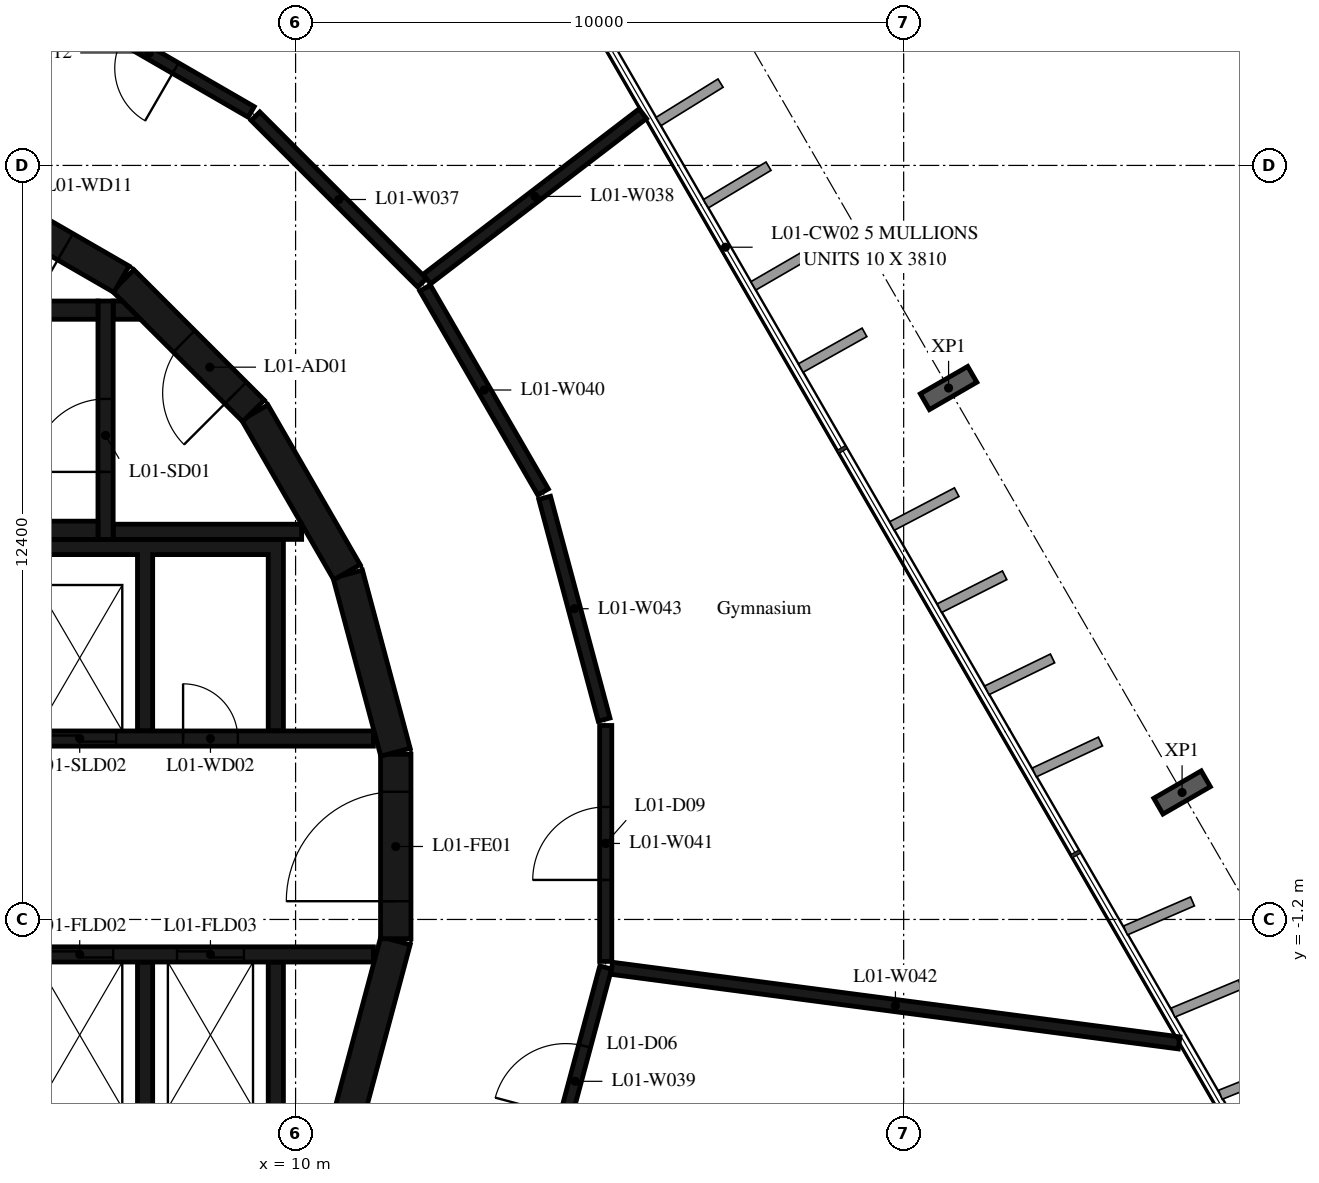
"""IFC4 building model, lengths in metres.
Left out: names, types, materials, properties, quantities, classifications, styles, units other than length and angle.
Written with IfcOpenShell. Run it as: python <this file> out.ifc"""

import sys

from ifc_helpers import new_model, si_unit, direction, frame, frame_2d, origin, origin_2d, place, context, subcontext, project, spatial, polyline, rectangle, i_section, outline, extrude, element, fill, save


model = new_model("IFC4")
c1 = context("Model", 3, precision=1e-05, world=origin(), true_north=direction((0.0, 1.0)))
c2 = subcontext(c1, "Body", "Model", "MODEL_VIEW")
j1 = project(units=[si_unit("LENGTHUNIT", "METRE"), si_unit("PLANEANGLEUNIT", "RADIAN")], contexts=[c1])
p1 = place(None, origin())
s1 = spatial("IfcSite", under=j1, at=p1, CompositionType="ELEMENT")
p2 = place(p1, origin())
s2 = spatial("IfcBuilding", under=s1, at=p2, CompositionType="ELEMENT")
p3 = place(p2, frame((0.0, 0.0, 9.0)))
s3 = spatial("IfcBuildingStorey", under=s2, at=p3, CompositionType="ELEMENT", Elevation=9.0)
for number, where, z_axis, x_axis in (
    (1, (24.579, 0.888, -0.38), (0.0, 0.0, 1.0), (0.5, -0.866, 0.0)),
    (2, (20.739, 7.539, -0.38), (0.0, 0.0, 1.0), (0.5, -0.866, 0.0)),
):
    element("IfcColumn", number, at=place(p3, frame(where, z_axis=z_axis, x_axis=x_axis)), inside=s3, PredefinedType="COLUMN", context=c2, shape_type="SweptSolid", body=[
        extrude(i_section(OverallWidth=0.3, OverallDepth=0.9, WebThickness=0.019, FlangeThickness=0.035, FilletRadius=0.03, at=origin_2d()), origin(), (0.0, 0.0, 1.0), 4.8),
    ])
p4 = place(p3, frame((10.858, -4.479, 0.0), z_axis=(0.0, 0.0, 1.0), x_axis=(0.258734743916, 0.965948410781, 0.0)))
e3 = element("IfcWall", 3, at=p4, inside=s3, PredefinedType="SHEAR", context=c2, shape_type="SweptSolid", body=[
    extrude(rectangle(XDim=3.033, YDim=0.5, at=frame_2d((1.516, 0.0))), origin(), (0.0, 0.0, 1.0), 4.42),
])
p5 = place(p3, frame((11.647, -1.516, 0.0), z_axis=(0.0, 0.0, 1.0), x_axis=(0.0, 1.0, 0.0)))
e4 = element("IfcWall", 4, at=p5, inside=s3, PredefinedType="SHEAR", context=c2, shape_type="SweptSolid", body=[
    extrude(rectangle(XDim=3.033, YDim=0.5, at=frame_2d((1.516, 0.0))), origin(), (0.0, 0.0, 1.0), 4.42),
])
p6 = place(p5, frame((0.616, 0.0, 0.0)))
e5 = element("IfcOpeningElement", 5, at=p6, cuts=e4, PredefinedType="OPENING", context=c2, shape_type="SweptSolid", body=[
    extrude(rectangle(XDim=1.8, YDim=2.1, at=frame_2d((0.9, 1.05))), frame((0.0, 0.26, 0.0), z_axis=(0.0, -1.0, 0.0), x_axis=(1.0, 0.0, 0.0)), (0.0, 0.0, 1.0), 0.52),
])
for number, where, z_axis, x_axis in (
    (6, (11.643, 1.55, 0.0), (0.0, 0.0, 1.0), (-0.259, 0.966, 0.0)),
    (7, (10.845, 4.51, 0.0), (0.0, 0.0, 1.0), (-0.5, 0.866, 0.0)),
):
    element("IfcWall", number, at=place(p3, frame(where, z_axis=z_axis, x_axis=x_axis)), inside=s3, PredefinedType="SHEAR", context=c2, shape_type="SweptSolid", body=[
        extrude(rectangle(XDim=3.033, YDim=0.5, at=frame_2d((1.516, 0.0))), origin(), (0.0, 0.0, 1.0), 4.42),
    ])
p7 = place(p3, frame((9.308, 7.164, 0.0), z_axis=(0.0, 0.0, 1.0), x_axis=(-0.707106781187, 0.707106781187, 0.0)))
e8 = element("IfcWall", 8, at=p7, inside=s3, PredefinedType="SHEAR", context=c2, shape_type="SweptSolid", body=[
    extrude(rectangle(XDim=3.032, YDim=0.5, at=frame_2d((1.516, 0.0))), origin(), (0.0, 0.0, 1.0), 4.42),
])
p8 = place(p7, frame((0.416, 0.0, 0.0)))
e9 = element("IfcOpeningElement", 9, at=p8, cuts=e8, PredefinedType="OPENING", context=c2, shape_type="SweptSolid", body=[
    extrude(rectangle(XDim=1.2, YDim=2.1, at=frame_2d((0.6, 1.05))), frame((0.0, 0.26, 0.0), z_axis=(0.0, -1.0, 0.0), x_axis=(1.0, 0.0, 0.0)), (0.0, 0.0, 1.0), 0.52),
])
p9 = place(p3, frame((7.137, 9.329, 0.0), z_axis=(0.0, 0.0, 1.0), x_axis=(-0.865975092491, 0.500087131594, 0.0)))
e10 = element("IfcWall", 10, at=p9, inside=s3, PredefinedType="SHEAR", context=c2, shape_type="SweptSolid", body=[
    extrude(rectangle(XDim=3.033, YDim=0.5, at=frame_2d((1.516, 0.0))), origin(), (0.0, 0.0, 1.0), 4.42),
])
p10 = place(p9, frame((1.066, 0.0, 0.0)))
e11 = element("IfcOpeningElement", 11, at=p10, cuts=e10, PredefinedType="OPENING", context=c2, shape_type="SweptSolid", body=[
    extrude(rectangle(XDim=0.9, YDim=2.1, at=frame_2d((0.45, 1.05))), frame((0.0, 0.26, 0.0), z_axis=(0.0, -1.0, 0.0), x_axis=(1.0, 0.0, 0.0)), (0.0, 0.0, 1.0), 0.52),
])
for number, where, z_axis, x_axis in (
    (12, (0.0, 5.2, 0.0), (0.0, 0.0, 1.0), (1.0, 0.0, 0.0)),
    (13, (0.0, 8.82, 0.0), (0.0, 0.0, 1.0), (1.0, 0.0, 0.0)),
):
    element("IfcWall", number, at=place(p3, frame(where, z_axis=z_axis, x_axis=x_axis)), inside=s3, PredefinedType="SHEAR", context=c2, shape_type="SweptSolid", body=[
        extrude(rectangle(XDim=6.75, YDim=0.3, at=frame_2d((3.375, 0.0))), origin(), (0.0, 0.0, 1.0), 4.42),
    ])
p11 = place(p3, frame((6.875, 5.05, 0.0), z_axis=(0.0, 0.0, 1.0), x_axis=(0.0, 1.0, 0.0)))
e14 = element("IfcWall", 14, at=p11, inside=s3, PredefinedType="SHEAR", context=c2, shape_type="SweptSolid", body=[
    extrude(rectangle(XDim=3.92, YDim=0.25, at=frame_2d((1.96, 0.0))), origin(), (0.0, 0.0, 1.0), 4.42),
])
p12 = place(p11, frame((1.11, 0.0, 0.0)))
e15 = element("IfcOpeningElement", 15, at=p12, cuts=e14, PredefinedType="OPENING", context=c2, shape_type="SweptSolid", body=[
    extrude(rectangle(XDim=1.2, YDim=2.1, at=frame_2d((0.6, 1.05))), frame((0.0, 0.135, 0.0), z_axis=(0.0, -1.0, 0.0), x_axis=(1.0, 0.0, 0.0)), (0.0, 0.0, 1.0), 0.27),
])
p13 = place(p3, frame((7.0, 5.175, 0.0), z_axis=(0.0, 0.0, 1.0), x_axis=(1.0, 0.0, 0.0)))
e16 = element("IfcWall", 16, at=p13, inside=s3, PredefinedType="SHEAR", context=c2, shape_type="SweptSolid", body=[
    extrude(rectangle(XDim=3.1, YDim=0.25, at=frame_2d((1.55, 0.0))), origin(), (0.0, 0.0, 1.0), 4.42),
])
p14 = place(p3, origin())
e17 = element("IfcWall", 17, at=p14, inside=s3, PredefinedType="SHEAR", context=c2, shape_type="SweptSolid", body=[
    extrude(outline(polyline([(7.448, 8.67), (7.0, 8.67), (7.0, 8.97), (7.148, 8.97), (7.448, 8.67)])), origin(), (0.0, 0.0, 1.0), 4.42),
])
p15 = place(p3, origin())
e18 = element("IfcWall", 18, at=p15, inside=s3, PredefinedType="SHEAR", context=c2, shape_type="SweptSolid", body=[
    extrude(outline(polyline([(-9.55, 4.8), (-7.65, 4.8), (-7.65, 1.9), (-7.4, 1.9), (-7.4, 4.8), (-5.5, 4.8), (-5.5, 1.9), (-5.25, 1.9), (-5.25, 4.8), (-3.35, 4.8), (-3.35, 1.9), (-3.1, 1.9), (-3.1, 4.8), (-1.2, 4.8), (-1.2, 1.9), (-0.95, 1.9), (-0.95, 4.8), (3.1, 4.8), (3.1, 1.9), (3.35, 1.9), (3.35, 4.8), (5.25, 4.8), (5.25, 1.9), (5.5, 1.9), (5.5, 4.8), (7.4, 4.8), (7.4, 1.9), (7.65, 1.9), (7.65, 4.8), (9.55, 4.8), (9.55, 1.9), (9.8, 1.9), (9.8, 4.8), (9.8, 5.05), (-9.8, 5.05), (-9.8, 4.8), (-9.8, 1.9), (-9.55, 1.9), (-9.55, 4.8)])), origin(), (0.0, 0.0, 1.0), 4.42),
])
p16 = place(p3, origin())
e19 = element("IfcWall", 19, at=p16, inside=s3, PredefinedType="SHEAR", context=c2, shape_type="SweptSolid", body=[
    extrude(outline(polyline([(9.8, -5.05), (9.8, -4.8), (9.8, -1.9), (9.55, -1.9), (9.55, -4.8), (7.65, -4.8), (7.65, -1.9), (7.4, -1.9), (7.4, -4.8), (5.5, -4.8), (5.5, -1.9), (5.25, -1.9), (5.25, -4.8), (3.35, -4.8), (3.35, -1.9), (3.1, -1.9), (3.1, -4.8), (1.2, -4.8), (1.2, -1.9), (0.95, -1.9), (0.95, -4.8), (-0.95, -4.8), (-0.95, -1.9), (-1.2, -1.9), (-1.2, -4.8), (-5.25, -4.8), (-5.25, -1.9), (-5.5, -1.9), (-5.5, -4.8), (-7.4, -4.8), (-7.4, -1.9), (-7.65, -1.9), (-7.65, -4.8), (-9.55, -4.8), (-9.55, -1.9), (-9.8, -1.9), (-9.8, -4.8), (-9.8, -5.05), (9.8, -5.05)])), origin(), (0.0, 0.0, 1.0), 4.42),
])
p17 = place(p3, frame((3.35, 1.775, 0.0), z_axis=(0.0, 0.0, 1.0), x_axis=(1.0, 0.0, 0.0)))
e20 = element("IfcWall", 20, at=p17, inside=s3, PredefinedType="SHEAR", context=c2, shape_type="SweptSolid", body=[
    extrude(rectangle(XDim=7.93, YDim=0.25, at=frame_2d((3.965, 0.0))), origin(), (0.0, 0.0, 1.0), 4.42),
])
p18 = place(p17, frame((0.35, 0.0, 0.0)))
e21 = element("IfcOpeningElement", 21, at=p18, cuts=e20, PredefinedType="OPENING", context=c2, shape_type="SweptSolid", body=[
    extrude(rectangle(XDim=1.2, YDim=2.4, at=frame_2d((0.6, 1.2))), frame((0.0, 0.135, 0.0), z_axis=(0.0, -1.0, 0.0), x_axis=(1.0, 0.0, 0.0)), (0.0, 0.0, 1.0), 0.27),
])
p19 = place(p17, frame((2.5, 0.0, 0.0)))
e22 = element("IfcOpeningElement", 22, at=p19, cuts=e20, PredefinedType="OPENING", context=c2, shape_type="SweptSolid", body=[
    extrude(rectangle(XDim=1.2, YDim=2.4, at=frame_2d((0.6, 1.2))), frame((0.0, 0.135, 0.0), z_axis=(0.0, -1.0, 0.0), x_axis=(1.0, 0.0, 0.0)), (0.0, 0.0, 1.0), 0.27),
])
p20 = place(p17, frame((4.8, 0.0, 0.0)))
e23 = element("IfcOpeningElement", 23, at=p20, cuts=e20, PredefinedType="OPENING", context=c2, shape_type="SweptSolid", body=[
    extrude(rectangle(XDim=0.9, YDim=2.1, at=frame_2d((0.45, 1.05))), frame((0.0, 0.135, 0.0), z_axis=(0.0, -1.0, 0.0), x_axis=(1.0, 0.0, 0.0)), (0.0, 0.0, 1.0), 0.27),
])
p21 = place(p3, frame((3.35, -1.775, 0.0), z_axis=(0.0, 0.0, 1.0), x_axis=(1.0, 0.0, 0.0)))
e24 = element("IfcWall", 24, at=p21, inside=s3, PredefinedType="SHEAR", context=c2, shape_type="SweptSolid", body=[
    extrude(rectangle(XDim=7.93, YDim=0.25, at=frame_2d((3.965, 0.0))), origin(), (0.0, 0.0, 1.0), 4.42),
])
p22 = place(p21, frame((0.4, 0.0, 0.0)))
e25 = element("IfcOpeningElement", 25, at=p22, cuts=e24, PredefinedType="OPENING", context=c2, shape_type="SweptSolid", body=[
    extrude(rectangle(XDim=1.1, YDim=2.4, at=frame_2d((0.55, 1.2))), frame((0.0, 0.135, 0.0), z_axis=(0.0, -1.0, 0.0), x_axis=(1.0, 0.0, 0.0)), (0.0, 0.0, 1.0), 0.27),
])
p23 = place(p21, frame((2.55, 0.0, 0.0)))
e26 = element("IfcOpeningElement", 26, at=p23, cuts=e24, PredefinedType="OPENING", context=c2, shape_type="SweptSolid", body=[
    extrude(rectangle(XDim=1.1, YDim=2.4, at=frame_2d((0.55, 1.2))), frame((0.0, 0.135, 0.0), z_axis=(0.0, -1.0, 0.0), x_axis=(1.0, 0.0, 0.0)), (0.0, 0.0, 1.0), 0.27),
])
p24 = place(p21, frame((4.7, 0.0, 0.0)))
e27 = element("IfcOpeningElement", 27, at=p24, cuts=e24, PredefinedType="OPENING", context=c2, shape_type="SweptSolid", body=[
    extrude(rectangle(XDim=1.1, YDim=2.4, at=frame_2d((0.55, 1.2))), frame((0.0, 0.135, 0.0), z_axis=(0.0, -1.0, 0.0), x_axis=(1.0, 0.0, 0.0)), (0.0, 0.0, 1.0), 0.27),
])
p25 = place(p3, frame((9.27, 12.08, 0.0), z_axis=(0.0, 0.0, 1.0), x_axis=(-0.865601686425, 0.500733182901, 0.0)))
e28 = element("IfcWall", 28, at=p25, inside=s3, PredefinedType="PARTITIONING", context=c2, shape_type="SweptSolid", body=[
    extrude(rectangle(XDim=3.874, YDim=0.2, at=frame_2d((1.937, 0.0))), origin(), (0.0, 0.0, 1.0), 4.42),
])
p26 = place(p25, frame((1.437, 0.0, 0.0)))
e29 = element("IfcOpeningElement", 29, at=p26, cuts=e28, PredefinedType="OPENING", context=c2, shape_type="SweptSolid", body=[
    extrude(rectangle(XDim=1.0, YDim=2.1, at=frame_2d((0.5, 1.05))), frame((0.0, 0.11, 0.0), z_axis=(0.0, -1.0, 0.0), x_axis=(1.0, 0.0, 0.0)), (0.0, 0.0, 1.0), 0.22),
])
p27 = place(p3, frame((12.08, 9.27, 0.0), z_axis=(0.0, 0.0, 1.0), x_axis=(-0.707106781187, 0.707106781187, 0.0)))
e30 = element("IfcWall", 30, at=p27, inside=s3, PredefinedType="PARTITIONING", context=c2, shape_type="SweptSolid", body=[
    extrude(rectangle(XDim=3.874, YDim=0.2, at=frame_2d((1.937, 0.0))), origin(), (0.0, 0.0, 1.0), 4.42),
])
p28 = place(p3, frame((12.159, 9.331, 0.0), z_axis=(0.0, 0.0, 1.0), x_axis=(0.793912908327, 0.608031490954, 0.0)))
e31 = element("IfcWall", 31, at=p28, inside=s3, PredefinedType="PARTITIONING", context=c2, shape_type="SweptSolid", body=[
    extrude(rectangle(XDim=4.472, YDim=0.2, at=frame_2d((2.236, 0.0))), origin(), (0.0, 0.0, 1.0), 4.42),
])
p29 = place(p3, frame((14.096, -5.733, 0.0), z_axis=(0.0, 0.0, 1.0), x_axis=(0.259085569159, 0.96585437197, 0.0)))
e32 = element("IfcWall", 32, at=p29, inside=s3, PredefinedType="PARTITIONING", context=c2, shape_type="SweptSolid", body=[
    extrude(rectangle(XDim=3.876, YDim=0.2, at=frame_2d((1.938, 0.0))), origin(), (0.0, 0.0, 1.0), 4.42),
])
p30 = place(p29, frame((1.338, 0.0, 0.0)))
e33 = element("IfcOpeningElement", 33, at=p30, cuts=e32, PredefinedType="OPENING", context=c2, shape_type="SweptSolid", body=[
    extrude(rectangle(XDim=1.2, YDim=2.1, at=frame_2d((0.6, 1.05))), frame((0.0, 0.11, 0.0), z_axis=(0.0, -1.0, 0.0), x_axis=(1.0, 0.0, 0.0)), (0.0, 0.0, 1.0), 0.22),
])
p31 = place(p3, frame((14.07, 5.83, 0.0), z_axis=(0.0, 0.0, 1.0), x_axis=(-0.500760497952, 0.865585884642, 0.0)))
e34 = element("IfcWall", 34, at=p31, inside=s3, PredefinedType="PARTITIONING", context=c2, shape_type="SweptSolid", body=[
    extrude(rectangle(XDim=3.874, YDim=0.2, at=frame_2d((1.937, 0.0))), origin(), (0.0, 0.0, 1.0), 4.42),
])
p32 = place(p3, frame((15.1, -1.89, 0.0), z_axis=(0.0, 0.0, 1.0), x_axis=(0.0, 1.0, 0.0)))
e35 = element("IfcWall", 35, at=p32, inside=s3, PredefinedType="PARTITIONING", context=c2, shape_type="SweptSolid", body=[
    extrude(rectangle(XDim=3.88, YDim=0.2, at=frame_2d((1.94, 0.0))), origin(), (0.0, 0.0, 1.0), 4.42),
])
p33 = place(p32, frame((1.34, 0.0, 0.0)))
e36 = element("IfcOpeningElement", 36, at=p33, cuts=e35, PredefinedType="OPENING", context=c2, shape_type="SweptSolid", body=[
    extrude(rectangle(XDim=1.2, YDim=2.1, at=frame_2d((0.6, 1.05))), frame((0.0, 0.11, 0.0), z_axis=(0.0, -1.0, 0.0), x_axis=(1.0, 0.0, 0.0)), (0.0, 0.0, 1.0), 0.22),
])
p34 = place(p3, frame((15.199, -2.003, 0.0), z_axis=(0.0, 0.0, 1.0), x_axis=(0.991463740717, -0.130382709146, 0.0)))
e37 = element("IfcWall", 37, at=p34, inside=s3, PredefinedType="PARTITIONING", context=c2, shape_type="SweptSolid", body=[
    extrude(rectangle(XDim=9.411, YDim=0.2, at=frame_2d((4.706, 0.0))), origin(), (0.0, 0.0, 1.0), 4.42),
])
p35 = place(p3, frame((15.074, 2.087, 0.0), z_axis=(0.0, 0.0, 1.0), x_axis=(-0.259038819442, 0.965866911133, 0.0)))
e38 = element("IfcWall", 38, at=p35, inside=s3, PredefinedType="PARTITIONING", context=c2, shape_type="SweptSolid", body=[
    extrude(rectangle(XDim=3.776, YDim=0.2, at=frame_2d((1.888, 0.0))), origin(), (0.0, 0.0, 1.0), 4.42),
])
p36 = place(p12, origin())
e39 = element("IfcDoor", 39, at=p36, inside=s3, OperationType="SINGLE_SWING_LEFT", PredefinedType="DOOR", context=c2, shape_type="SweptSolid", body=[
    extrude(rectangle(XDim=1.2, YDim=2.1, at=frame_2d((0.6, 1.05))), frame((0.0, 0.025, 0.0), z_axis=(0.0, -1.0, 0.0), x_axis=(1.0, 0.0, 0.0)), (0.0, 0.0, 1.0), 0.05),
])
fill(e15, e39)
p37 = place(p8, origin())
e40 = element("IfcDoor", 40, at=p37, inside=s3, OperationType="SINGLE_SWING_RIGHT", PredefinedType="DOOR", context=c2, shape_type="SweptSolid", body=[
    extrude(rectangle(XDim=1.2, YDim=2.1, at=frame_2d((0.6, 1.05))), frame((0.0, 0.025, 0.0), z_axis=(0.0, -1.0, 0.0), x_axis=(1.0, 0.0, 0.0)), (0.0, 0.0, 1.0), 0.05),
])
fill(e9, e40)
p38 = place(p6, origin())
e41 = element("IfcDoor", 41, at=p38, inside=s3, OperationType="DOUBLE_DOOR_SINGLE_SWING", PredefinedType="DOOR", context=c2, shape_type="SweptSolid", body=[
    extrude(rectangle(XDim=1.8, YDim=2.1, at=frame_2d((0.9, 1.05))), frame((0.0, 0.025, 0.0), z_axis=(0.0, -1.0, 0.0), x_axis=(1.0, 0.0, 0.0)), (0.0, 0.0, 1.0), 0.05),
])
fill(e5, e41)
p39 = place(p19, origin())
e42 = element("IfcDoor", 42, at=p39, inside=s3, OperationType="DOUBLE_DOOR_SLIDING", PredefinedType="DOOR", context=c2, shape_type="SweptSolid", body=[
    extrude(rectangle(XDim=1.2, YDim=2.4, at=frame_2d((0.6, 1.2))), frame((0.0, 0.025, 0.0), z_axis=(0.0, -1.0, 0.0), x_axis=(1.0, 0.0, 0.0)), (0.0, 0.0, 1.0), 0.05),
])
fill(e22, e42)
p40 = place(p23, origin())
e43 = element("IfcDoor", 43, at=p40, inside=s3, OperationType="DOUBLE_DOOR_SLIDING", PredefinedType="DOOR", context=c2, shape_type="SweptSolid", body=[
    extrude(rectangle(XDim=1.1, YDim=2.4, at=frame_2d((0.55, 1.2))), frame((0.0, 0.025, 0.0), z_axis=(0.0, -1.0, 0.0), x_axis=(1.0, 0.0, 0.0)), (0.0, 0.0, 1.0), 0.05),
])
fill(e26, e43)
p41 = place(p24, origin())
e44 = element("IfcDoor", 44, at=p41, inside=s3, OperationType="DOUBLE_DOOR_SLIDING", PredefinedType="DOOR", context=c2, shape_type="SweptSolid", body=[
    extrude(rectangle(XDim=1.1, YDim=2.4, at=frame_2d((0.55, 1.2))), frame((0.0, 0.025, 0.0), z_axis=(0.0, -1.0, 0.0), x_axis=(1.0, 0.0, 0.0)), (0.0, 0.0, 1.0), 0.05),
])
fill(e27, e44)
p42 = place(p20, origin())
e45 = element("IfcDoor", 45, at=p42, inside=s3, OperationType="SINGLE_SWING_LEFT", PredefinedType="DOOR", context=c2, shape_type="SweptSolid", body=[
    extrude(rectangle(XDim=0.9, YDim=2.1, at=frame_2d((0.45, 1.05))), frame((0.0, 0.025, 0.0), z_axis=(0.0, -1.0, 0.0), x_axis=(1.0, 0.0, 0.0)), (0.0, 0.0, 1.0), 0.05),
])
fill(e23, e45)
p43 = place(p10, origin())
e46 = element("IfcDoor", 46, at=p43, inside=s3, OperationType="SINGLE_SWING_RIGHT", PredefinedType="DOOR", context=c2, shape_type="SweptSolid", body=[
    extrude(rectangle(XDim=0.9, YDim=2.1, at=frame_2d((0.45, 1.05))), frame((0.0, 0.025, 0.0), z_axis=(0.0, -1.0, 0.0), x_axis=(1.0, 0.0, 0.0)), (0.0, 0.0, 1.0), 0.05),
])
fill(e11, e46)
p44 = place(p30, origin())
e47 = element("IfcDoor", 47, at=p44, inside=s3, OperationType="SINGLE_SWING_LEFT", PredefinedType="DOOR", context=c2, shape_type="SweptSolid", body=[
    extrude(rectangle(XDim=1.2, YDim=2.1, at=frame_2d((0.6, 1.05))), frame((0.0, 0.025, 0.0), z_axis=(0.0, -1.0, 0.0), x_axis=(1.0, 0.0, 0.0)), (0.0, 0.0, 1.0), 0.05),
])
fill(e33, e47)
p45 = place(p33, origin())
e48 = element("IfcDoor", 48, at=p45, inside=s3, OperationType="SINGLE_SWING_LEFT", PredefinedType="DOOR", context=c2, shape_type="SweptSolid", body=[
    extrude(rectangle(XDim=1.2, YDim=2.1, at=frame_2d((0.6, 1.05))), frame((0.0, 0.025, 0.0), z_axis=(0.0, -1.0, 0.0), x_axis=(1.0, 0.0, 0.0)), (0.0, 0.0, 1.0), 0.05),
])
fill(e36, e48)
p46 = place(p26, origin())
e49 = element("IfcDoor", 49, at=p46, inside=s3, OperationType="SINGLE_SWING_LEFT", PredefinedType="DOOR", context=c2, shape_type="SweptSolid", body=[
    extrude(rectangle(XDim=1.0, YDim=2.1, at=frame_2d((0.5, 1.05))), frame((0.0, 0.025, 0.0), z_axis=(0.0, -1.0, 0.0), x_axis=(1.0, 0.0, 0.0)), (0.0, 0.0, 1.0), 0.05),
])
fill(e29, e49)
save(model, sys.argv[1])
